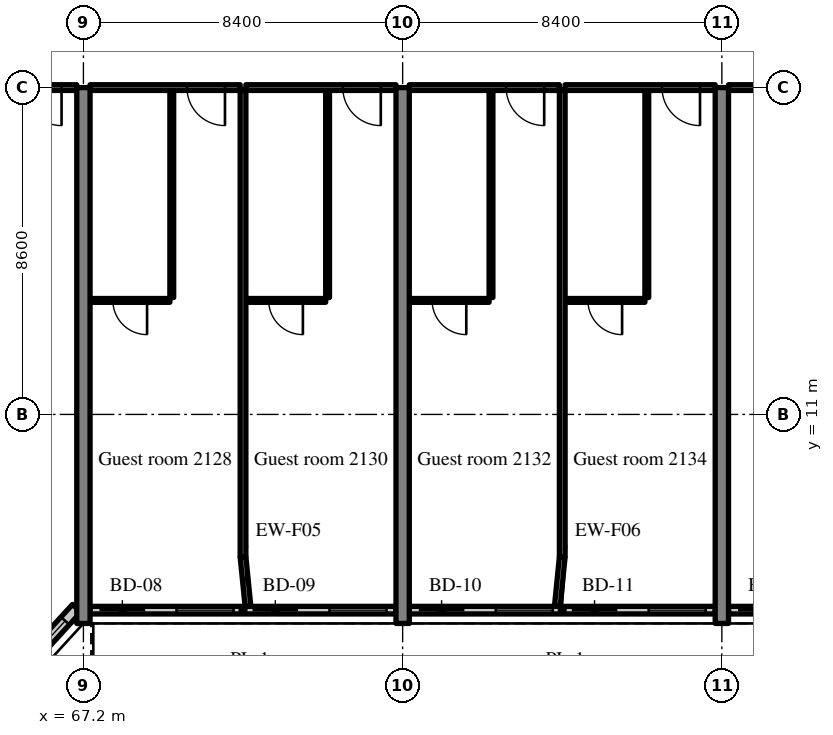
"""IFC4 building model, lengths in metres.
Left out: names, types, materials, properties, quantities, classifications, styles, units other than length and angle.
Written with IfcOpenShell. Run it as: python <this file> out.ifc"""

import sys

from ifc_helpers import new_model, si_unit, direction, frame, frame_2d, origin, place, context, subcontext, project, spatial, rectangle, extrude, source, transform, mapped, element, fill, save


model = new_model("IFC4")
c1 = context("Model", 3, precision=1e-05, world=origin(), true_north=direction((0.0, 1.0)))
c2 = subcontext(c1, "Body", "Model", "MODEL_VIEW")
j1 = project(units=[si_unit("LENGTHUNIT", "METRE"), si_unit("PLANEANGLEUNIT", "RADIAN")], contexts=[c1])
p1 = place(None, origin())
s1 = spatial("IfcSite", under=j1, at=p1, CompositionType="ELEMENT")
p2 = place(p1, origin())
s2 = spatial("IfcBuilding", under=s1, at=p2, CompositionType="ELEMENT")
p3 = place(p2, frame((0.0, 0.0, 91.4)))
s3 = spatial("IfcBuildingStorey", under=s2, at=p3, CompositionType="ELEMENT", Elevation=91.4)
m1 = source(origin(), c2, "Body", "SweptSolid", [
    extrude(rectangle(XDim=14.1, YDim=0.35, at=frame_2d((7.05, 0.0))), origin(), (0.0, 0.0, 1.0), 3.52),
])
for number, where, z_axis, x_axis in (
    (1, (67.2, 5.5, 0.0), (0.0, 0.0, 1.0), (0.0, 1.0, 0.0)),
    (2, (75.6, 5.5, 0.0), (0.0, 0.0, 1.0), (0.0, 1.0, 0.0)),
    (3, (84.0, 5.5, 0.0), (0.0, 0.0, 1.0), (0.0, 1.0, 0.0)),
):
    element("IfcWall", number, at=place(p3, frame(where, z_axis=z_axis, x_axis=x_axis)), inside=s3, PredefinedType="SHEAR", context=c2, shape_type="MappedRepresentation", body=[
        mapped(m1, transform((0.0, 0.0, 0.0), scale=1.0)),
    ])
m2 = source(origin(), c2, "Body", "SweptSolid", [
    extrude(rectangle(XDim=2.398, YDim=0.3, at=frame_2d((1.199, 0.0))), origin(), (0.0, 0.0, 1.0), 3.52),
])
p4 = place(p3, frame((65.404, 4.131, 0.0), z_axis=(0.0, 0.0, 1.0), x_axis=(0.675374189419, 0.737475222815, 0.0)))
e4 = element("IfcWall", 4, at=p4, inside=s3, PredefinedType="SOLIDWALL", context=c2, shape_type="MappedRepresentation", body=[
    mapped(m2, transform((0.0, 0.0, 0.0), scale=1.0)),
])
m3 = source(origin(), c2, "Body", "SweptSolid", [
    extrude(rectangle(XDim=1.5, YDim=2.0, at=frame_2d((0.75, 1.0))), frame((0.0, 0.16, 0.0), z_axis=(0.0, -1.0, 0.0), x_axis=(1.0, 0.0, 0.0)), (0.0, 0.0, 1.0), 0.32),
])
p5 = place(p4, frame((0.449, 0.0, 0.9)))
e5 = element("IfcOpeningElement", 5, at=p5, cuts=e4, PredefinedType="OPENING", context=c2, shape_type="MappedRepresentation", body=[
    mapped(m3, transform((0.0, 0.0, 0.0), scale=1.0)),
])
m4 = source(origin(), c2, "Body", "SweptSolid", [
    extrude(rectangle(XDim=8.05, YDim=0.2, at=frame_2d((4.025, 0.0))), origin(), (0.0, 0.0, 1.0), 2.82),
])
p6 = place(p3, frame((67.375, 5.85, 0.0), z_axis=(0.0, 0.0, 1.0), x_axis=(1.0, 0.0, 0.0)))
e6 = element("IfcWall", 6, at=p6, inside=s3, PredefinedType="SOLIDWALL", context=c2, shape_type="MappedRepresentation", body=[
    mapped(m4, transform((0.0, 0.0, 0.0), scale=1.0)),
])
m5 = source(origin(), c2, "Body", "SweptSolid", [
    extrude(rectangle(XDim=1.2, YDim=2.4, at=frame_2d((0.6, 1.2))), frame((0.0, 0.11, 0.0), z_axis=(0.0, -1.0, 0.0), x_axis=(1.0, 0.0, 0.0)), (0.0, 0.0, 1.0), 0.22),
])
p7 = place(p6, frame((0.25, 0.0, 0.0)))
e7 = element("IfcOpeningElement", 7, at=p7, cuts=e6, PredefinedType="OPENING", context=c2, shape_type="MappedRepresentation", body=[
    mapped(m5, transform((0.0, 0.0, 0.0), scale=1.0)),
])
m6 = source(origin(), c2, "Body", "SweptSolid", [
    extrude(rectangle(XDim=1.5, YDim=1.5, at=frame_2d((0.75, 0.75))), frame((0.0, 0.11, 0.0), z_axis=(0.0, -1.0, 0.0), x_axis=(1.0, 0.0, 0.0)), (0.0, 0.0, 1.0), 0.22),
])
p8 = place(p6, frame((2.275, 0.0, 0.9)))
e8 = element("IfcOpeningElement", 8, at=p8, cuts=e6, PredefinedType="OPENING", context=c2, shape_type="MappedRepresentation", body=[
    mapped(m6, transform((0.0, 0.0, 0.0), scale=1.0)),
])
p9 = place(p6, frame((4.275, 0.0, 0.0)))
e9 = element("IfcOpeningElement", 9, at=p9, cuts=e6, PredefinedType="OPENING", context=c2, shape_type="MappedRepresentation", body=[
    mapped(m5, transform((0.0, 0.0, 0.0), scale=1.0)),
])
p10 = place(p6, frame((6.3, 0.0, 0.9)))
e10 = element("IfcOpeningElement", 10, at=p10, cuts=e6, PredefinedType="OPENING", context=c2, shape_type="MappedRepresentation", body=[
    mapped(m6, transform((0.0, 0.0, 0.0), scale=1.0)),
])
p11 = place(p3, frame((75.775, 5.85, 0.0), z_axis=(0.0, 0.0, 1.0), x_axis=(1.0, 0.0, 0.0)))
e11 = element("IfcWall", 11, at=p11, inside=s3, PredefinedType="SOLIDWALL", context=c2, shape_type="MappedRepresentation", body=[
    mapped(m4, transform((0.0, 0.0, 0.0), scale=1.0)),
])
p12 = place(p11, frame((0.25, 0.0, 0.0)))
e12 = element("IfcOpeningElement", 12, at=p12, cuts=e11, PredefinedType="OPENING", context=c2, shape_type="MappedRepresentation", body=[
    mapped(m5, transform((0.0, 0.0, 0.0), scale=1.0)),
])
p13 = place(p11, frame((2.275, 0.0, 0.9)))
e13 = element("IfcOpeningElement", 13, at=p13, cuts=e11, PredefinedType="OPENING", context=c2, shape_type="MappedRepresentation", body=[
    mapped(m6, transform((0.0, 0.0, 0.0), scale=1.0)),
])
p14 = place(p11, frame((4.275, 0.0, 0.0)))
e14 = element("IfcOpeningElement", 14, at=p14, cuts=e11, PredefinedType="OPENING", context=c2, shape_type="MappedRepresentation", body=[
    mapped(m5, transform((0.0, 0.0, 0.0), scale=1.0)),
])
p15 = place(p11, frame((6.3, 0.0, 0.9)))
e15 = element("IfcOpeningElement", 15, at=p15, cuts=e11, PredefinedType="OPENING", context=c2, shape_type="MappedRepresentation", body=[
    mapped(m6, transform((0.0, 0.0, 0.0), scale=1.0)),
])
p16 = place(p3, frame((84.175, 5.85, 0.0), z_axis=(0.0, 0.0, 1.0), x_axis=(1.0, 0.0, 0.0)))
e16 = element("IfcWall", 16, at=p16, inside=s3, PredefinedType="SOLIDWALL", context=c2, shape_type="MappedRepresentation", body=[
    mapped(m4, transform((0.0, 0.0, 0.0), scale=1.0)),
])
p17 = place(p16, frame((0.25, 0.0, 0.0)))
e17 = element("IfcOpeningElement", 17, at=p17, cuts=e16, PredefinedType="OPENING", context=c2, shape_type="MappedRepresentation", body=[
    mapped(m5, transform((0.0, 0.0, 0.0), scale=1.0)),
])
p18 = place(p16, frame((2.275, 0.0, 0.9)))
e18 = element("IfcOpeningElement", 18, at=p18, cuts=e16, PredefinedType="OPENING", context=c2, shape_type="MappedRepresentation", body=[
    mapped(m6, transform((0.0, 0.0, 0.0), scale=1.0)),
])
p19 = place(p16, frame((4.275, 0.0, 0.0)))
e19 = element("IfcOpeningElement", 19, at=p19, cuts=e16, PredefinedType="OPENING", context=c2, shape_type="MappedRepresentation", body=[
    mapped(m5, transform((0.0, 0.0, 0.0), scale=1.0)),
])
p20 = place(p16, frame((6.3, 0.0, 0.9)))
e20 = element("IfcOpeningElement", 20, at=p20, cuts=e16, PredefinedType="OPENING", context=c2, shape_type="MappedRepresentation", body=[
    mapped(m6, transform((0.0, 0.0, 0.0), scale=1.0)),
])
m7 = source(origin(), c2, "Body", "SweptSolid", [
    extrude(rectangle(XDim=8.05, YDim=0.15, at=frame_2d((4.025, 0.0))), origin(), (0.0, 0.0, 1.0), 2.82),
])
p21 = place(p3, frame((58.975, 19.6, 0.0), z_axis=(0.0, 0.0, 1.0), x_axis=(1.0, 0.0, 0.0)))
e21 = element("IfcWall", 21, at=p21, inside=s3, PredefinedType="PARTITIONING", context=c2, shape_type="MappedRepresentation", body=[
    mapped(m7, transform((0.0, 0.0, 0.0), scale=1.0)),
])
m8 = source(origin(), c2, "Body", "SweptSolid", [
    extrude(rectangle(XDim=1.0, YDim=2.1, at=frame_2d((0.5, 1.05))), frame((0.0, 0.085, 0.0), z_axis=(0.0, -1.0, 0.0), x_axis=(1.0, 0.0, 0.0)), (0.0, 0.0, 1.0), 0.17),
])
p22 = place(p21, frame((6.65, 0.0, 0.0)))
e22 = element("IfcOpeningElement", 22, at=p22, cuts=e21, PredefinedType="OPENING", context=c2, shape_type="MappedRepresentation", body=[
    mapped(m8, transform((0.0, 0.0, 0.0), scale=1.0)),
])
m9 = source(origin(), c2, "Body", "SweptSolid", [
    extrude(rectangle(XDim=5.45, YDim=0.1, at=frame_2d((2.725, 0.0))), origin(), (0.0, 0.0, 1.0), 3.52),
])
p23 = place(p3, frame((69.525, 14.075, 0.0), z_axis=(0.0, 0.0, 1.0), x_axis=(0.0, 1.0, 0.0)))
e23 = element("IfcWall", 23, at=p23, inside=s3, PredefinedType="PARTITIONING", context=c2, shape_type="MappedRepresentation", body=[
    mapped(m9, transform((0.0, 0.0, 0.0), scale=1.0)),
])
m10 = source(origin(), c2, "Body", "SweptSolid", [
    extrude(rectangle(XDim=2.1, YDim=0.1, at=frame_2d((1.05, 0.0))), origin(), (0.0, 0.0, 1.0), 3.52),
])
p24 = place(p3, frame((67.375, 14.0, 0.0), z_axis=(0.0, 0.0, 1.0), x_axis=(1.0, 0.0, 0.0)))
e24 = element("IfcWall", 24, at=p24, inside=s3, PredefinedType="PARTITIONING", context=c2, shape_type="MappedRepresentation", body=[
    mapped(m10, transform((0.0, 0.0, 0.0), scale=1.0)),
])
m11 = source(origin(), c2, "Body", "SweptSolid", [
    extrude(rectangle(XDim=0.9, YDim=2.1, at=frame_2d((0.45, 1.05))), frame((0.0, 0.06, 0.0), z_axis=(0.0, -1.0, 0.0), x_axis=(1.0, 0.0, 0.0)), (0.0, 0.0, 1.0), 0.12),
])
p25 = place(p24, frame((0.6, 0.0, 0.0)))
e25 = element("IfcOpeningElement", 25, at=p25, cuts=e24, PredefinedType="OPENING", context=c2, shape_type="MappedRepresentation", body=[
    mapped(m11, transform((0.0, 0.0, 0.0), scale=1.0)),
])
m12 = source(origin(), c2, "Body", "SweptSolid", [
    extrude(rectangle(XDim=3.95, YDim=0.15, at=frame_2d((1.975, 0.0))), origin(), (0.0, 0.0, 1.0), 2.82),
])
p26 = place(p3, frame((67.375, 19.6, 0.0), z_axis=(0.0, 0.0, 1.0), x_axis=(1.0, 0.0, 0.0)))
e26 = element("IfcWall", 26, at=p26, inside=s3, PredefinedType="PARTITIONING", context=c2, shape_type="MappedRepresentation", body=[
    mapped(m12, transform((0.0, 0.0, 0.0), scale=1.0)),
])
p27 = place(p26, frame((2.55, 0.0, 0.0)))
e27 = element("IfcOpeningElement", 27, at=p27, cuts=e26, PredefinedType="OPENING", context=c2, shape_type="MappedRepresentation", body=[
    mapped(m8, transform((0.0, 0.0, 0.0), scale=1.0)),
])
p28 = place(p3, frame((73.625, 14.075, 0.0), z_axis=(0.0, 0.0, 1.0), x_axis=(0.0, 1.0, 0.0)))
e28 = element("IfcWall", 28, at=p28, inside=s3, PredefinedType="PARTITIONING", context=c2, shape_type="MappedRepresentation", body=[
    mapped(m9, transform((0.0, 0.0, 0.0), scale=1.0)),
])
m13 = source(origin(), c2, "Body", "SweptSolid", [
    extrude(rectangle(XDim=2.1, YDim=0.1, at=frame_2d((1.05, 0.0))), origin(), (0.0, 0.0, 1.0), 3.52),
])
p29 = place(p3, frame((71.475, 14.0, 0.0), z_axis=(0.0, 0.0, 1.0), x_axis=(1.0, 0.0, 0.0)))
e29 = element("IfcWall", 29, at=p29, inside=s3, PredefinedType="PARTITIONING", context=c2, shape_type="MappedRepresentation", body=[
    mapped(m13, transform((0.0, 0.0, 0.0), scale=1.0)),
])
p30 = place(p29, frame((0.6, 0.0, 0.0)))
e30 = element("IfcOpeningElement", 30, at=p30, cuts=e29, PredefinedType="OPENING", context=c2, shape_type="MappedRepresentation", body=[
    mapped(m11, transform((0.0, 0.0, 0.0), scale=1.0)),
])
p31 = place(p3, frame((71.475, 19.6, 0.0), z_axis=(0.0, 0.0, 1.0), x_axis=(1.0, 0.0, 0.0)))
e31 = element("IfcWall", 31, at=p31, inside=s3, PredefinedType="PARTITIONING", context=c2, shape_type="MappedRepresentation", body=[
    mapped(m12, transform((0.0, 0.0, 0.0), scale=1.0)),
])
p32 = place(p31, frame((2.55, 0.0, 0.0)))
e32 = element("IfcOpeningElement", 32, at=p32, cuts=e31, PredefinedType="OPENING", context=c2, shape_type="MappedRepresentation", body=[
    mapped(m8, transform((0.0, 0.0, 0.0), scale=1.0)),
])
m14 = source(origin(), c2, "Body", "SweptSolid", [
    extrude(rectangle(XDim=12.275, YDim=0.15, at=frame_2d((6.137, 0.0))), origin(), (0.0, 0.0, 1.0), 3.52),
])
p33 = place(p3, frame((71.4, 7.25, 0.0), z_axis=(0.0, 0.0, 1.0), x_axis=(0.0, 1.0, 0.0)))
e33 = element("IfcWall", 33, at=p33, inside=s3, PredefinedType="PARTITIONING", context=c2, shape_type="MappedRepresentation", body=[
    mapped(m14, transform((0.0, 0.0, 0.0), scale=1.0)),
])
p34 = place(p3, frame((77.925, 14.075, 0.0), z_axis=(0.0, 0.0, 1.0), x_axis=(0.0, 1.0, 0.0)))
e34 = element("IfcWall", 34, at=p34, inside=s3, PredefinedType="PARTITIONING", context=c2, shape_type="MappedRepresentation", body=[
    mapped(m9, transform((0.0, 0.0, 0.0), scale=1.0)),
])
p35 = place(p3, frame((75.775, 14.0, 0.0), z_axis=(0.0, 0.0, 1.0), x_axis=(1.0, 0.0, 0.0)))
e35 = element("IfcWall", 35, at=p35, inside=s3, PredefinedType="PARTITIONING", context=c2, shape_type="MappedRepresentation", body=[
    mapped(m10, transform((0.0, 0.0, 0.0), scale=1.0)),
])
p36 = place(p35, frame((0.6, 0.0, 0.0)))
e36 = element("IfcOpeningElement", 36, at=p36, cuts=e35, PredefinedType="OPENING", context=c2, shape_type="MappedRepresentation", body=[
    mapped(m11, transform((0.0, 0.0, 0.0), scale=1.0)),
])
m15 = source(origin(), c2, "Body", "SweptSolid", [
    extrude(rectangle(XDim=3.95, YDim=0.15, at=frame_2d((1.975, 0.0))), origin(), (0.0, 0.0, 1.0), 2.82),
])
p37 = place(p3, frame((75.775, 19.6, 0.0), z_axis=(0.0, 0.0, 1.0), x_axis=(1.0, 0.0, 0.0)))
e37 = element("IfcWall", 37, at=p37, inside=s3, PredefinedType="PARTITIONING", context=c2, shape_type="MappedRepresentation", body=[
    mapped(m15, transform((0.0, 0.0, 0.0), scale=1.0)),
])
p38 = place(p37, frame((2.55, 0.0, 0.0)))
e38 = element("IfcOpeningElement", 38, at=p38, cuts=e37, PredefinedType="OPENING", context=c2, shape_type="MappedRepresentation", body=[
    mapped(m8, transform((0.0, 0.0, 0.0), scale=1.0)),
])
p39 = place(p3, frame((82.025, 14.075, 0.0), z_axis=(0.0, 0.0, 1.0), x_axis=(0.0, 1.0, 0.0)))
e39 = element("IfcWall", 39, at=p39, inside=s3, PredefinedType="PARTITIONING", context=c2, shape_type="MappedRepresentation", body=[
    mapped(m9, transform((0.0, 0.0, 0.0), scale=1.0)),
])
p40 = place(p3, frame((79.875, 14.0, 0.0), z_axis=(0.0, 0.0, 1.0), x_axis=(1.0, 0.0, 0.0)))
e40 = element("IfcWall", 40, at=p40, inside=s3, PredefinedType="PARTITIONING", context=c2, shape_type="MappedRepresentation", body=[
    mapped(m10, transform((0.0, 0.0, 0.0), scale=1.0)),
])
p41 = place(p40, frame((0.6, 0.0, 0.0)))
e41 = element("IfcOpeningElement", 41, at=p41, cuts=e40, PredefinedType="OPENING", context=c2, shape_type="MappedRepresentation", body=[
    mapped(m11, transform((0.0, 0.0, 0.0), scale=1.0)),
])
p42 = place(p3, frame((79.875, 19.6, 0.0), z_axis=(0.0, 0.0, 1.0), x_axis=(1.0, 0.0, 0.0)))
e42 = element("IfcWall", 42, at=p42, inside=s3, PredefinedType="PARTITIONING", context=c2, shape_type="MappedRepresentation", body=[
    mapped(m12, transform((0.0, 0.0, 0.0), scale=1.0)),
])
p43 = place(p42, frame((2.55, 0.0, 0.0)))
e43 = element("IfcOpeningElement", 43, at=p43, cuts=e42, PredefinedType="OPENING", context=c2, shape_type="MappedRepresentation", body=[
    mapped(m8, transform((0.0, 0.0, 0.0), scale=1.0)),
])
p44 = place(p3, frame((79.8, 7.25, 0.0), z_axis=(0.0, 0.0, 1.0), x_axis=(0.0, 1.0, 0.0)))
e44 = element("IfcWall", 44, at=p44, inside=s3, PredefinedType="PARTITIONING", context=c2, shape_type="MappedRepresentation", body=[
    mapped(m14, transform((0.0, 0.0, 0.0), scale=1.0)),
])
p45 = place(p3, frame((84.175, 19.6, 0.0), z_axis=(0.0, 0.0, 1.0), x_axis=(1.0, 0.0, 0.0)))
e45 = element("IfcWall", 45, at=p45, inside=s3, PredefinedType="PARTITIONING", context=c2, shape_type="MappedRepresentation", body=[
    mapped(m12, transform((0.0, 0.0, 0.0), scale=1.0)),
])
p46 = place(p45, frame((1.475, 0.0, 0.0)))
e46 = element("IfcOpeningElement", 46, at=p46, cuts=e45, PredefinedType="OPENING", context=c2, shape_type="MappedRepresentation", body=[
    mapped(m8, transform((0.0, 0.0, 0.0), scale=1.0)),
])
m16 = source(origin(), c2, "Body", "SweptSolid", [
    extrude(rectangle(XDim=1.307, YDim=0.15, at=frame_2d((0.653, 0.0))), origin(), (0.0, 0.0, 1.0), 3.52),
])
for number, where, z_axis, x_axis in (
    (47, (71.53, 5.95, 0.0), (0.0, 0.0, 1.0), (-0.1, 0.995, 0.0)),
    (48, (79.67, 5.95, 0.0), (0.0, 0.0, 1.0), (0.1, 0.995, 0.0)),
):
    element("IfcWall", number, at=place(p3, frame(where, z_axis=z_axis, x_axis=x_axis)), inside=s3, PredefinedType="PARTITIONING", context=c2, shape_type="MappedRepresentation", body=[
        mapped(m16, transform((0.0, 0.0, 0.0), scale=1.0)),
    ])
m17 = source(origin(), c2, "Body", "SweptSolid", [
    extrude(rectangle(XDim=1.5, YDim=2.0, at=frame_2d((0.75, 1.0))), frame((0.0, 0.03, 0.0), z_axis=(0.0, -1.0, 0.0), x_axis=(1.0, 0.0, 0.0)), (0.0, 0.0, 1.0), 0.06),
])
p47 = place(p5, origin())
e49 = element("IfcWindow", 49, at=p47, inside=s3, PartitioningType="SINGLE_PANEL", PredefinedType="WINDOW", context=c2, shape_type="MappedRepresentation", body=[
    mapped(m17, transform((0.0, 0.0, 0.0), scale=1.0)),
])
fill(e5, e49)
m18 = source(origin(), c2, "Body", "SweptSolid", [
    extrude(rectangle(XDim=1.2, YDim=2.4, at=frame_2d((0.6, 1.2))), frame((0.0, 0.025, 0.0), z_axis=(0.0, -1.0, 0.0), x_axis=(1.0, 0.0, 0.0)), (0.0, 0.0, 1.0), 0.05),
])
p48 = place(p7, origin())
e50 = element("IfcDoor", 50, at=p48, inside=s3, OperationType="SLIDING_TO_RIGHT", PredefinedType="DOOR", context=c2, shape_type="MappedRepresentation", body=[
    mapped(m18, transform((0.0, 0.0, 0.0), scale=1.0)),
])
fill(e7, e50)
m19 = source(origin(), c2, "Body", "SweptSolid", [
    extrude(rectangle(XDim=1.5, YDim=1.5, at=frame_2d((0.75, 0.75))), frame((0.0, 0.03, 0.0), z_axis=(0.0, -1.0, 0.0), x_axis=(1.0, 0.0, 0.0)), (0.0, 0.0, 1.0), 0.06),
])
p49 = place(p8, origin())
e51 = element("IfcWindow", 51, at=p49, inside=s3, PartitioningType="SINGLE_PANEL", PredefinedType="WINDOW", context=c2, shape_type="MappedRepresentation", body=[
    mapped(m19, transform((0.0, 0.0, 0.0), scale=1.0)),
])
fill(e8, e51)
p50 = place(p9, origin())
e52 = element("IfcDoor", 52, at=p50, inside=s3, OperationType="SLIDING_TO_LEFT", PredefinedType="DOOR", context=c2, shape_type="MappedRepresentation", body=[
    mapped(m18, transform((0.0, 0.0, 0.0), scale=1.0)),
])
fill(e9, e52)
p51 = place(p10, origin())
e53 = element("IfcWindow", 53, at=p51, inside=s3, PartitioningType="SINGLE_PANEL", PredefinedType="WINDOW", context=c2, shape_type="MappedRepresentation", body=[
    mapped(m19, transform((0.0, 0.0, 0.0), scale=1.0)),
])
fill(e10, e53)
p52 = place(p12, origin())
e54 = element("IfcDoor", 54, at=p52, inside=s3, OperationType="SLIDING_TO_RIGHT", PredefinedType="DOOR", context=c2, shape_type="MappedRepresentation", body=[
    mapped(m18, transform((0.0, 0.0, 0.0), scale=1.0)),
])
fill(e12, e54)
p53 = place(p13, origin())
e55 = element("IfcWindow", 55, at=p53, inside=s3, PartitioningType="SINGLE_PANEL", PredefinedType="WINDOW", context=c2, shape_type="MappedRepresentation", body=[
    mapped(m19, transform((0.0, 0.0, 0.0), scale=1.0)),
])
fill(e13, e55)
p54 = place(p14, origin())
e56 = element("IfcDoor", 56, at=p54, inside=s3, OperationType="SLIDING_TO_LEFT", PredefinedType="DOOR", context=c2, shape_type="MappedRepresentation", body=[
    mapped(m18, transform((0.0, 0.0, 0.0), scale=1.0)),
])
fill(e14, e56)
p55 = place(p15, origin())
e57 = element("IfcWindow", 57, at=p55, inside=s3, PartitioningType="SINGLE_PANEL", PredefinedType="WINDOW", context=c2, shape_type="MappedRepresentation", body=[
    mapped(m19, transform((0.0, 0.0, 0.0), scale=1.0)),
])
fill(e15, e57)
p56 = place(p17, origin())
e58 = element("IfcDoor", 58, at=p56, inside=s3, OperationType="SLIDING_TO_RIGHT", PredefinedType="DOOR", context=c2, shape_type="MappedRepresentation", body=[
    mapped(m18, transform((0.0, 0.0, 0.0), scale=1.0)),
])
fill(e17, e58)
m20 = source(origin(), c2, "Body", "SweptSolid", [
    extrude(rectangle(XDim=1.0, YDim=2.1, at=frame_2d((0.5, 1.05))), frame((0.0, 0.025, 0.0), z_axis=(0.0, -1.0, 0.0), x_axis=(1.0, 0.0, 0.0)), (0.0, 0.0, 1.0), 0.05),
])
p57 = place(p22, origin())
e59 = element("IfcDoor", 59, at=p57, inside=s3, OperationType="SINGLE_SWING_RIGHT", PredefinedType="DOOR", context=c2, shape_type="MappedRepresentation", body=[
    mapped(m20, transform((0.0, 0.0, 0.0), scale=1.0)),
])
fill(e22, e59)
m21 = source(origin(), c2, "Body", "SweptSolid", [
    extrude(rectangle(XDim=0.9, YDim=2.1, at=frame_2d((0.45, 1.05))), frame((0.0, 0.025, 0.0), z_axis=(0.0, -1.0, 0.0), x_axis=(1.0, 0.0, 0.0)), (0.0, 0.0, 1.0), 0.05),
])
p58 = place(p25, origin())
e60 = element("IfcDoor", 60, at=p58, inside=s3, OperationType="SINGLE_SWING_RIGHT", PredefinedType="DOOR", context=c2, shape_type="MappedRepresentation", body=[
    mapped(m21, transform((0.0, 0.0, 0.0), scale=1.0)),
])
fill(e25, e60)
p59 = place(p27, origin())
e61 = element("IfcDoor", 61, at=p59, inside=s3, OperationType="SINGLE_SWING_RIGHT", PredefinedType="DOOR", context=c2, shape_type="MappedRepresentation", body=[
    mapped(m20, transform((0.0, 0.0, 0.0), scale=1.0)),
])
fill(e27, e61)
p60 = place(p30, origin())
e62 = element("IfcDoor", 62, at=p60, inside=s3, OperationType="SINGLE_SWING_RIGHT", PredefinedType="DOOR", context=c2, shape_type="MappedRepresentation", body=[
    mapped(m21, transform((0.0, 0.0, 0.0), scale=1.0)),
])
fill(e30, e62)
p61 = place(p32, origin())
e63 = element("IfcDoor", 63, at=p61, inside=s3, OperationType="SINGLE_SWING_RIGHT", PredefinedType="DOOR", context=c2, shape_type="MappedRepresentation", body=[
    mapped(m20, transform((0.0, 0.0, 0.0), scale=1.0)),
])
fill(e32, e63)
p62 = place(p36, origin())
e64 = element("IfcDoor", 64, at=p62, inside=s3, OperationType="SINGLE_SWING_RIGHT", PredefinedType="DOOR", context=c2, shape_type="MappedRepresentation", body=[
    mapped(m21, transform((0.0, 0.0, 0.0), scale=1.0)),
])
fill(e36, e64)
p63 = place(p38, origin())
e65 = element("IfcDoor", 65, at=p63, inside=s3, OperationType="SINGLE_SWING_RIGHT", PredefinedType="DOOR", context=c2, shape_type="MappedRepresentation", body=[
    mapped(m20, transform((0.0, 0.0, 0.0), scale=1.0)),
])
fill(e38, e65)
p64 = place(p41, origin())
e66 = element("IfcDoor", 66, at=p64, inside=s3, OperationType="SINGLE_SWING_RIGHT", PredefinedType="DOOR", context=c2, shape_type="MappedRepresentation", body=[
    mapped(m21, transform((0.0, 0.0, 0.0), scale=1.0)),
])
fill(e41, e66)
p65 = place(p43, origin())
e67 = element("IfcDoor", 67, at=p65, inside=s3, OperationType="SINGLE_SWING_RIGHT", PredefinedType="DOOR", context=c2, shape_type="MappedRepresentation", body=[
    mapped(m20, transform((0.0, 0.0, 0.0), scale=1.0)),
])
fill(e43, e67)
save(model, sys.argv[1])
